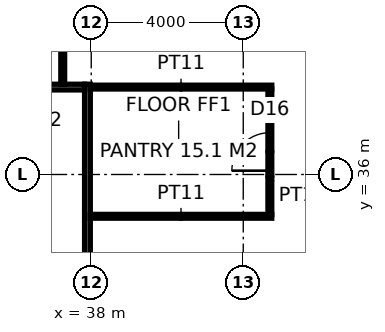
"""IFC4 building model, lengths in metres.
Left out: names, types, materials, properties, quantities, classifications, styles, units other than length and angle.
Written with IfcOpenShell. Run it as: python <this file> out.ifc"""

import sys

from ifc_helpers import new_model, si_unit, direction, frame, frame_2d, origin, place, context, subcontext, project, spatial, rectangle, extrude, element, fill, save


model = new_model("IFC4")
c1 = context("Model", 3, precision=1e-05, world=origin(), true_north=direction((0.0, 1.0)))
c2 = subcontext(c1, "Body", "Model", "MODEL_VIEW")
j1 = project(units=[si_unit("LENGTHUNIT", "METRE"), si_unit("PLANEANGLEUNIT", "RADIAN")], contexts=[c1])
p1 = place(None, origin())
s1 = spatial("IfcSite", under=j1, at=p1, CompositionType="ELEMENT")
p2 = place(p1, origin())
s2 = spatial("IfcBuilding", under=s1, at=p2, CompositionType="ELEMENT")
p3 = place(p2, frame((0.0, 0.0, 93.4)))
s3 = spatial("IfcBuildingStorey", under=s2, at=p3, CompositionType="ELEMENT", Elevation=93.4)
p4 = place(p3, frame((37.9, 15.625, 0.0), z_axis=(0.0, 0.0, 1.0), x_axis=(0.0, 1.0, 0.0)))
e1 = element("IfcWall", 1, at=p4, inside=s3, PredefinedType="PARTITIONING", context=c2, shape_type="SweptSolid", body=[
    extrude(rectangle(XDim=22.75, YDim=0.15, at=frame_2d((11.375, 0.0))), origin(), (0.0, 0.0, 1.0), 2.95),
])
p5 = place(p4, frame((4.974, 0.0, 0.0)))
e2 = element("IfcOpeningElement", 2, at=p5, cuts=e1, PredefinedType="OPENING", context=c2, shape_type="SweptSolid", body=[
    extrude(rectangle(XDim=1.8, YDim=2.4, at=frame_2d((0.9, 1.2))), frame((0.0, 0.085, 0.0), z_axis=(0.0, -1.0, 0.0), x_axis=(1.0, 0.0, 0.0)), (0.0, 0.0, 1.0), 0.17),
])
p6 = place(p4, frame((16.226, 0.0, 0.0)))
e3 = element("IfcOpeningElement", 3, at=p6, cuts=e1, PredefinedType="OPENING", context=c2, shape_type="SweptSolid", body=[
    extrude(rectangle(XDim=1.8, YDim=2.4, at=frame_2d((0.9, 1.2))), frame((0.0, 0.085, 0.0), z_axis=(0.0, -1.0, 0.0), x_axis=(1.0, 0.0, 0.0)), (0.0, 0.0, 1.0), 0.17),
])
p7 = place(p3, frame((15.775, 38.3, 0.0), z_axis=(0.0, 0.0, 1.0), x_axis=(1.0, 0.0, 0.0)))
e4 = element("IfcWall", 4, at=p7, inside=s3, PredefinedType="PARTITIONING", context=c2, shape_type="SweptSolid", body=[
    extrude(rectangle(XDim=22.05, YDim=0.15, at=frame_2d((11.025, 0.0))), origin(), (0.0, 0.0, 1.0), 3.85),
])
p8 = place(p7, frame((7.975, 0.0, 0.0)))
e5 = element("IfcOpeningElement", 5, at=p8, cuts=e4, PredefinedType="OPENING", context=c2, shape_type="SweptSolid", body=[
    extrude(rectangle(XDim=0.9, YDim=2.1, at=frame_2d((0.45, 1.05))), frame((0.0, 0.085, 0.0), z_axis=(0.0, -1.0, 0.0), x_axis=(1.0, 0.0, 0.0)), (0.0, 0.0, 1.0), 0.17),
])
p9 = place(p7, frame((11.725, 0.0, 0.0)))
e6 = element("IfcOpeningElement", 6, at=p9, cuts=e4, PredefinedType="OPENING", context=c2, shape_type="SweptSolid", body=[
    extrude(rectangle(XDim=1.0, YDim=2.1, at=frame_2d((0.5, 1.05))), frame((0.0, 0.085, 0.0), z_axis=(0.0, -1.0, 0.0), x_axis=(1.0, 0.0, 0.0)), (0.0, 0.0, 1.0), 0.17),
])
p10 = place(p7, frame((15.575, 0.0, 0.0)))
e7 = element("IfcOpeningElement", 7, at=p10, cuts=e4, PredefinedType="OPENING", context=c2, shape_type="SweptSolid", body=[
    extrude(rectangle(XDim=0.9, YDim=2.1, at=frame_2d((0.45, 1.05))), frame((0.0, 0.085, 0.0), z_axis=(0.0, -1.0, 0.0), x_axis=(1.0, 0.0, 0.0)), (0.0, 0.0, 1.0), 0.17),
])
for number, where, z_axis, x_axis in (
    (8, (37.975, 34.9, 0.0), (0.0, 0.0, 1.0), (1.0, 0.0, 0.0)),
    (9, (37.975, 38.3, 0.0), (0.0, 0.0, 1.0), (1.0, 0.0, 0.0)),
):
    element("IfcWall", number, at=place(p3, frame(where, z_axis=z_axis, x_axis=x_axis)), inside=s3, PredefinedType="PARTITIONING", context=c2, shape_type="SweptSolid", body=[
        extrude(rectangle(XDim=4.775, YDim=0.1, at=frame_2d((2.387, 0.0))), origin(), (0.0, 0.0, 1.0), 3.85),
    ])
p11 = place(p3, frame((37.25, 38.375, 0.0), z_axis=(0.0, 0.0, 1.0), x_axis=(0.0, 1.0, 0.0)))
e10 = element("IfcWall", 10, at=p11, inside=s3, PredefinedType="PARTITIONING", context=c2, shape_type="SweptSolid", body=[
    extrude(rectangle(XDim=3.475, YDim=0.1, at=frame_2d((1.738, 0.0))), origin(), (0.0, 0.0, 1.0), 3.85),
])
p12 = place(p3, frame((42.7, 34.95, 0.0), z_axis=(0.0, 0.0, 1.0), x_axis=(0.0, 1.0, 0.0)))
e11 = element("IfcWall", 11, at=p12, inside=s3, PredefinedType="PARTITIONING", context=c2, shape_type="SweptSolid", body=[
    extrude(rectangle(XDim=3.3, YDim=0.1, at=frame_2d((1.65, 0.0))), origin(), (0.0, 0.0, 1.0), 3.85),
])
p13 = place(p12, frame((1.15, 0.0, 0.0)))
e12 = element("IfcOpeningElement", 12, at=p13, cuts=e11, PredefinedType="OPENING", context=c2, shape_type="SweptSolid", body=[
    extrude(rectangle(XDim=1.0, YDim=2.2, at=frame_2d((0.5, 1.1))), frame((0.0, 0.06, 0.0), z_axis=(0.0, -1.0, 0.0), x_axis=(1.0, 0.0, 0.0)), (0.0, 0.0, 1.0), 0.12),
])
p14 = place(p13, origin())
e13 = element("IfcDoor", 13, at=p14, inside=s3, OperationType="SINGLE_SWING_LEFT", PredefinedType="DOOR", context=c2, shape_type="SweptSolid", body=[
    extrude(rectangle(XDim=1.0, YDim=2.2, at=frame_2d((0.5, 1.1))), frame((0.0, 0.025, 0.0), z_axis=(0.0, -1.0, 0.0), x_axis=(1.0, 0.0, 0.0)), (0.0, 0.0, 1.0), 0.05),
])
fill(e12, e13)
save(model, sys.argv[1])
